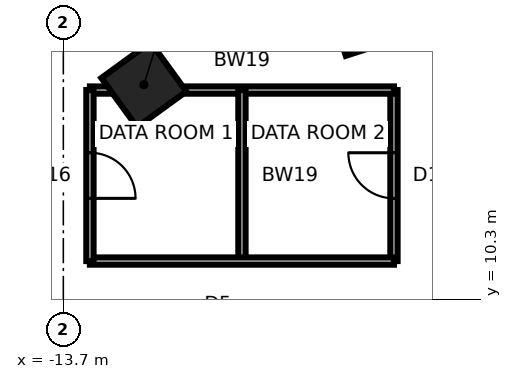
"""IFC4 building model, lengths in metres.
Left out: names, types, materials, properties, quantities, classifications, styles, units other than length and angle.
Written with IfcOpenShell. Run it as: python <this file> out.ifc"""

import sys

from ifc_helpers import new_model, si_unit, direction, frame, frame_2d, origin, origin_2d, place, context, subcontext, project, spatial, rectangle, extrude, element, fill, save


model = new_model("IFC4")
c1 = context("Model", 3, precision=1e-05, world=origin(), true_north=direction((0.0, 1.0)))
c2 = subcontext(c1, "Body", "Model", "MODEL_VIEW")
j1 = project(units=[si_unit("LENGTHUNIT", "METRE"), si_unit("PLANEANGLEUNIT", "RADIAN")], contexts=[c1])
p1 = place(None, origin())
s1 = spatial("IfcSite", under=j1, at=p1, CompositionType="ELEMENT")
p2 = place(p1, origin())
s2 = spatial("IfcBuilding", under=s1, at=p2, CompositionType="ELEMENT")
p3 = place(p2, frame((0.0, 0.0, 135.3)))
s3 = spatial("IfcBuildingStorey", under=s2, at=p3, CompositionType="ELEMENT", Elevation=135.3)
for number, where, z_axis, x_axis in (
    (1, (-5.754, 17.708, 0.0), (0.0, 0.0, 1.0), (-0.309, 0.951, 0.0)),
    (2, (-11.581, 15.94, 0.0), (0.0, 0.0, 1.0), (-0.588, 0.809, 0.0)),
):
    element("IfcColumn", number, at=place(p3, frame(where, z_axis=z_axis, x_axis=x_axis)), inside=s3, PredefinedType="COLUMN", context=c2, shape_type="SweptSolid", body=[
        extrude(rectangle(XDim=1.6, YDim=1.6, at=origin_2d()), origin(), (0.0, 0.0, 1.0), 3.9),
    ])
p4 = place(p3, frame((-5.0, 15.8, 0.0), z_axis=(0.0, 0.0, 1.0), x_axis=(0.0, -1.0, 0.0)))
e3 = element("IfcWall", 3, at=p4, inside=s3, PredefinedType="SOLIDWALL", context=c2, shape_type="SweptSolid", body=[
    extrude(rectangle(XDim=4.5, YDim=0.19, at=frame_2d((2.25, 0.0))), origin(), (0.0, 0.0, 1.0), 3.74),
])
p5 = place(p4, frame((1.65, 0.0, 0.0)))
e4 = element("IfcOpeningElement", 4, at=p5, cuts=e3, PredefinedType="OPENING", context=c2, shape_type="SweptSolid", body=[
    extrude(rectangle(XDim=1.2, YDim=2.1, at=frame_2d((0.6, 1.05))), frame((0.0, 0.105, 0.0), z_axis=(0.0, -1.0, 0.0), x_axis=(1.0, 0.0, 0.0)), (0.0, 0.0, 1.0), 0.21),
])
p6 = place(p3, frame((-13.0, 15.8, 0.0), z_axis=(0.0, 0.0, 1.0), x_axis=(1.0, 0.0, 0.0)))
e5 = element("IfcWall", 5, at=p6, inside=s3, PredefinedType="SOLIDWALL", context=c2, shape_type="SweptSolid", body=[
    extrude(rectangle(XDim=8.0, YDim=0.19, at=frame_2d((4.0, 0.0))), origin(), (0.0, 0.0, 1.0), 3.74),
])
p7 = place(p3, frame((-9.0, 15.8, 0.0), z_axis=(0.0, 0.0, 1.0), x_axis=(0.0, -1.0, 0.0)))
e6 = element("IfcWall", 6, at=p7, inside=s3, PredefinedType="SOLIDWALL", context=c2, shape_type="SweptSolid", body=[
    extrude(rectangle(XDim=4.5, YDim=0.19, at=frame_2d((2.25, 0.0))), origin(), (0.0, 0.0, 1.0), 3.74),
])
p8 = place(p3, frame((-5.0, 11.3, 0.0), z_axis=(0.0, 0.0, 1.0), x_axis=(-1.0, 0.0, 0.0)))
e7 = element("IfcWall", 7, at=p8, inside=s3, PredefinedType="SOLIDWALL", context=c2, shape_type="SweptSolid", body=[
    extrude(rectangle(XDim=8.0, YDim=0.19, at=frame_2d((4.0, 0.0))), origin(), (0.0, 0.0, 1.0), 3.74),
])
p9 = place(p3, frame((-13.0, 11.3, 0.0), z_axis=(0.0, 0.0, 1.0), x_axis=(0.0, 1.0, 0.0)))
e8 = element("IfcWall", 8, at=p9, inside=s3, PredefinedType="SOLIDWALL", context=c2, shape_type="SweptSolid", body=[
    extrude(rectangle(XDim=4.5, YDim=0.19, at=frame_2d((2.25, 0.0))), origin(), (0.0, 0.0, 1.0), 3.74),
])
p10 = place(p9, frame((1.65, 0.0, 0.0)))
e9 = element("IfcOpeningElement", 9, at=p10, cuts=e8, PredefinedType="OPENING", context=c2, shape_type="SweptSolid", body=[
    extrude(rectangle(XDim=1.2, YDim=2.1, at=frame_2d((0.6, 1.05))), frame((0.0, 0.105, 0.0), z_axis=(0.0, -1.0, 0.0), x_axis=(1.0, 0.0, 0.0)), (0.0, 0.0, 1.0), 0.21),
])
p11 = place(p10, frame((1.2, 0.0, 0.0), z_axis=(0.0, 0.0, 1.0), x_axis=(-1.0, 0.0, 0.0)))
e10 = element("IfcDoor", 10, at=p11, inside=s3, OperationType="SINGLE_SWING_RIGHT", PredefinedType="DOOR", context=c2, shape_type="SweptSolid", body=[
    extrude(rectangle(XDim=1.2, YDim=2.1, at=frame_2d((0.6, 1.05))), frame((0.0, 0.025, 0.0), z_axis=(0.0, -1.0, 0.0), x_axis=(1.0, 0.0, 0.0)), (0.0, 0.0, 1.0), 0.05),
])
fill(e9, e10)
p12 = place(p5, frame((1.2, 0.0, 0.0), z_axis=(0.0, 0.0, 1.0), x_axis=(-1.0, 0.0, 0.0)))
e11 = element("IfcDoor", 11, at=p12, inside=s3, OperationType="SINGLE_SWING_RIGHT", PredefinedType="DOOR", context=c2, shape_type="SweptSolid", body=[
    extrude(rectangle(XDim=1.2, YDim=2.1, at=frame_2d((0.6, 1.05))), frame((0.0, 0.025, 0.0), z_axis=(0.0, -1.0, 0.0), x_axis=(1.0, 0.0, 0.0)), (0.0, 0.0, 1.0), 0.05),
])
fill(e4, e11)
save(model, sys.argv[1])
